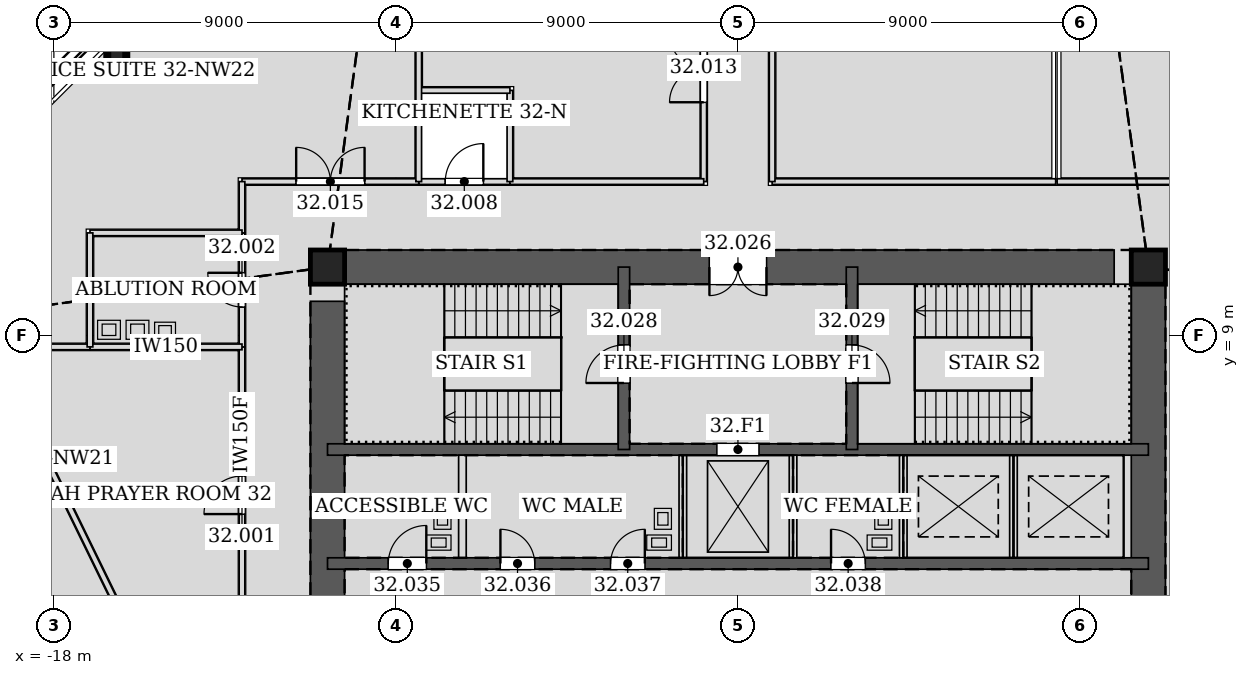
"""IFC4 building model, lengths in metres.
Left out: names, types, materials, properties, quantities, classifications, styles, units other than length and angle.
Written with IfcOpenShell. Run it as: python <this file> out.ifc"""

import sys

from ifc_helpers import new_model, si_unit, direction, frame, frame_2d, origin, origin_2d, place, context, subcontext, project, spatial, rectangle, hollow_rectangle, extrude, element, fill, save


model = new_model("IFC4")
c1 = context("Model", 3, precision=1e-05, world=origin(), true_north=direction((0.0, 1.0)))
c2 = subcontext(c1, "Body", "Model", "MODEL_VIEW")
j1 = project(units=[si_unit("LENGTHUNIT", "METRE"), si_unit("PLANEANGLEUNIT", "RADIAN")], contexts=[c1])
p1 = place(None, origin())
s1 = spatial("IfcSite", under=j1, at=p1, CompositionType="ELEMENT")
p2 = place(p1, origin())
s2 = spatial("IfcBuilding", under=s1, at=p2, CompositionType="ELEMENT")
p3 = place(p2, frame((0.0, 0.0, 142.8)))
s3 = spatial("IfcBuildingStorey", under=s2, at=p3, CompositionType="ELEMENT", Elevation=142.8)
p4 = place(p3, frame((-16.387, 16.387, 0.0), z_axis=(0.019988521213, -0.019988521213, 0.999600379171), x_axis=(0.707106781187, 0.707106781187, 0.0)))
e1 = element("IfcColumn", 1, at=p4, inside=s3, PredefinedType="COLUMN", context=c2, shape_type="SweptSolid", body=[
    extrude(hollow_rectangle(XDim=0.5, YDim=0.5, WallThickness=0.025, at=origin_2d()), origin(), (0.0, 0.0, 1.0), 4.202),
])
for number, where, z_axis, x_axis in (
    (2, (10.8, 10.8, 0.0), (0.0, 0.0, 1.0), (1.0, 0.0, 0.0)),
    (3, (-10.8, 10.8, 0.0), (0.0, 0.0, 1.0), (1.0, 0.0, 0.0)),
):
    element("IfcColumn", number, at=place(p3, frame(where, z_axis=z_axis, x_axis=x_axis)), inside=s3, PredefinedType="COLUMN", context=c2, shape_type="SweptSolid", body=[
        extrude(hollow_rectangle(XDim=0.9, YDim=0.9, WallThickness=0.06, at=origin_2d()), origin(), (0.0, 0.0, 1.0), 4.2),
    ])
p5 = place(p3, frame((10.8, -10.8, 0.0), z_axis=(0.0, 0.0, 1.0), x_axis=(0.0, 1.0, 0.0)))
e4 = element("IfcWall", 4, at=p5, inside=s3, PredefinedType="SOLIDWALL", context=c2, shape_type="SweptSolid", body=[
    extrude(rectangle(XDim=21.6, YDim=0.9, at=frame_2d((10.8, 0.0))), origin(), (0.0, 0.0, 1.0), 4.2),
])
p6 = place(p5, frame((11.7, 0.0, 0.0)))
e5 = element("IfcOpeningElement", 5, at=p6, cuts=e4, PredefinedType="OPENING", context=c2, shape_type="SweptSolid", body=[
    extrude(rectangle(XDim=1.2, YDim=2.1, at=frame_2d((0.6, 1.05))), frame((0.0, 0.46, 0.0), z_axis=(0.0, -1.0, 0.0), x_axis=(1.0, 0.0, 0.0)), (0.0, 0.0, 1.0), 0.92),
])
p7 = place(p5, frame((8.7, 0.0, 0.0)))
e6 = element("IfcOpeningElement", 6, at=p7, cuts=e4, PredefinedType="OPENING", context=c2, shape_type="SweptSolid", body=[
    extrude(rectangle(XDim=1.2, YDim=2.1, at=frame_2d((0.6, 1.05))), frame((0.0, 0.46, 0.0), z_axis=(0.0, -1.0, 0.0), x_axis=(1.0, 0.0, 0.0)), (0.0, 0.0, 1.0), 0.92),
])
p8 = place(p3, frame((10.8, 10.8, 0.0), z_axis=(0.0, 0.0, 1.0), x_axis=(-1.0, 0.0, 0.0)))
e7 = element("IfcWall", 7, at=p8, inside=s3, PredefinedType="SOLIDWALL", context=c2, shape_type="SweptSolid", body=[
    extrude(rectangle(XDim=21.6, YDim=0.9, at=frame_2d((10.8, 0.0))), origin(), (0.0, 0.0, 1.0), 4.2),
])
p9 = place(p8, frame((10.05, 0.0, 0.0)))
e8 = element("IfcOpeningElement", 8, at=p9, cuts=e7, PredefinedType="OPENING", context=c2, shape_type="SweptSolid", body=[
    extrude(rectangle(XDim=1.5, YDim=2.1, at=frame_2d((0.75, 1.05))), frame((0.0, 0.46, 0.0), z_axis=(0.0, -1.0, 0.0), x_axis=(1.0, 0.0, 0.0)), (0.0, 0.0, 1.0), 0.92),
])
p10 = place(p3, frame((-10.8, 10.8, 0.0), z_axis=(0.0, 0.0, 1.0), x_axis=(0.0, -1.0, 0.0)))
e9 = element("IfcWall", 9, at=p10, inside=s3, PredefinedType="SOLIDWALL", context=c2, shape_type="SweptSolid", body=[
    extrude(rectangle(XDim=21.6, YDim=0.9, at=frame_2d((10.8, 0.0))), origin(), (0.0, 0.0, 1.0), 4.2),
])
p11 = place(p10, frame((8.7, 0.0, 0.0)))
e10 = element("IfcOpeningElement", 10, at=p11, cuts=e9, PredefinedType="OPENING", context=c2, shape_type="SweptSolid", body=[
    extrude(rectangle(XDim=1.2, YDim=2.1, at=frame_2d((0.6, 1.05))), frame((0.0, 0.46, 0.0), z_axis=(0.0, -1.0, 0.0), x_axis=(1.0, 0.0, 0.0)), (0.0, 0.0, 1.0), 0.92),
])
p12 = place(p10, frame((11.7, 0.0, 0.0)))
e11 = element("IfcOpeningElement", 11, at=p12, cuts=e9, PredefinedType="OPENING", context=c2, shape_type="SweptSolid", body=[
    extrude(rectangle(XDim=1.2, YDim=2.1, at=frame_2d((0.6, 1.05))), frame((0.0, 0.46, 0.0), z_axis=(0.0, -1.0, 0.0), x_axis=(1.0, 0.0, 0.0)), (0.0, 0.0, 1.0), 0.92),
])
p13 = place(p3, frame((-10.8, 3.0, 0.0), z_axis=(0.0, 0.0, 1.0), x_axis=(1.0, 0.0, 0.0)))
e12 = element("IfcWall", 12, at=p13, inside=s3, PredefinedType="SOLIDWALL", context=c2, shape_type="SweptSolid", body=[
    extrude(rectangle(XDim=21.6, YDim=0.3, at=frame_2d((10.8, 0.0))), origin(), (0.0, 0.0, 1.0), 4.2),
])
p14 = place(p13, frame((1.6, 0.0, 0.0)))
e13 = element("IfcOpeningElement", 13, at=p14, cuts=e12, PredefinedType="OPENING", context=c2, shape_type="SweptSolid", body=[
    extrude(rectangle(XDim=1.0, YDim=2.1, at=frame_2d((0.5, 1.05))), frame((0.0, 0.16, 0.0), z_axis=(0.0, -1.0, 0.0), x_axis=(1.0, 0.0, 0.0)), (0.0, 0.0, 1.0), 0.32),
])
p15 = place(p13, frame((4.55, 0.0, 0.0)))
e14 = element("IfcOpeningElement", 14, at=p15, cuts=e12, PredefinedType="OPENING", context=c2, shape_type="SweptSolid", body=[
    extrude(rectangle(XDim=0.9, YDim=2.1, at=frame_2d((0.45, 1.05))), frame((0.0, 0.16, 0.0), z_axis=(0.0, -1.0, 0.0), x_axis=(1.0, 0.0, 0.0)), (0.0, 0.0, 1.0), 0.32),
])
p16 = place(p13, frame((7.45, 0.0, 0.0)))
e15 = element("IfcOpeningElement", 15, at=p16, cuts=e12, PredefinedType="OPENING", context=c2, shape_type="SweptSolid", body=[
    extrude(rectangle(XDim=0.9, YDim=2.1, at=frame_2d((0.45, 1.05))), frame((0.0, 0.16, 0.0), z_axis=(0.0, -1.0, 0.0), x_axis=(1.0, 0.0, 0.0)), (0.0, 0.0, 1.0), 0.32),
])
p17 = place(p13, frame((13.25, 0.0, 0.0)))
e16 = element("IfcOpeningElement", 16, at=p17, cuts=e12, PredefinedType="OPENING", context=c2, shape_type="SweptSolid", body=[
    extrude(rectangle(XDim=0.9, YDim=2.1, at=frame_2d((0.45, 1.05))), frame((0.0, 0.16, 0.0), z_axis=(0.0, -1.0, 0.0), x_axis=(1.0, 0.0, 0.0)), (0.0, 0.0, 1.0), 0.32),
])
p18 = place(p3, frame((-10.8, 6.0, 0.0), z_axis=(0.0, 0.0, 1.0), x_axis=(1.0, 0.0, 0.0)))
e17 = element("IfcWall", 17, at=p18, inside=s3, PredefinedType="SOLIDWALL", context=c2, shape_type="SweptSolid", body=[
    extrude(rectangle(XDim=21.6, YDim=0.3, at=frame_2d((10.8, 0.0))), origin(), (0.0, 0.0, 1.0), 4.2),
])
p19 = place(p18, frame((10.25, 0.0, 0.0)))
e18 = element("IfcOpeningElement", 18, at=p19, cuts=e17, PredefinedType="OPENING", context=c2, shape_type="SweptSolid", body=[
    extrude(rectangle(XDim=1.1, YDim=2.1, at=frame_2d((0.55, 1.05))), frame((0.0, 0.16, 0.0), z_axis=(0.0, -1.0, 0.0), x_axis=(1.0, 0.0, 0.0)), (0.0, 0.0, 1.0), 0.32),
])
p20 = place(p3, frame((-3.0, 6.0, 0.0), z_axis=(0.0, 0.0, 1.0), x_axis=(0.0, 1.0, 0.0)))
e19 = element("IfcWall", 19, at=p20, inside=s3, PredefinedType="SOLIDWALL", context=c2, shape_type="SweptSolid", body=[
    extrude(rectangle(XDim=4.8, YDim=0.3, at=frame_2d((2.4, 0.0))), origin(), (0.0, 0.0, 1.0), 4.2),
])
p21 = place(p20, frame((1.75, 0.0, 0.0)))
e20 = element("IfcOpeningElement", 20, at=p21, cuts=e19, PredefinedType="OPENING", context=c2, shape_type="SweptSolid", body=[
    extrude(rectangle(XDim=1.0, YDim=2.1, at=frame_2d((0.5, 1.05))), frame((0.0, 0.16, 0.0), z_axis=(0.0, -1.0, 0.0), x_axis=(1.0, 0.0, 0.0)), (0.0, 0.0, 1.0), 0.32),
])
p22 = place(p3, frame((3.0, 6.0, 0.0), z_axis=(0.0, 0.0, 1.0), x_axis=(0.0, 1.0, 0.0)))
e21 = element("IfcWall", 21, at=p22, inside=s3, PredefinedType="SOLIDWALL", context=c2, shape_type="SweptSolid", body=[
    extrude(rectangle(XDim=4.8, YDim=0.3, at=frame_2d((2.4, 0.0))), origin(), (0.0, 0.0, 1.0), 4.2),
])
p23 = place(p22, frame((1.75, 0.0, 0.0)))
e22 = element("IfcOpeningElement", 22, at=p23, cuts=e21, PredefinedType="OPENING", context=c2, shape_type="SweptSolid", body=[
    extrude(rectangle(XDim=1.0, YDim=2.1, at=frame_2d((0.5, 1.05))), frame((0.0, 0.16, 0.0), z_axis=(0.0, -1.0, 0.0), x_axis=(1.0, 0.0, 0.0)), (0.0, 0.0, 1.0), 0.32),
])
p24 = place(p3, frame((-13.05, 8.701, 0.0), z_axis=(0.0, 0.0, 1.0), x_axis=(0.0, -1.0, 0.0)))
e23 = element("IfcWall", 23, at=p24, inside=s3, PredefinedType="PARTITIONING", context=c2, shape_type="SweptSolid", body=[
    extrude(rectangle(XDim=7.801, YDim=0.15, at=frame_2d((3.9, 0.0))), origin(), (0.0, 0.0, 1.0), 4.035),
])
p25 = place(p24, frame((3.4, 0.0, 0.0)))
e24 = element("IfcOpeningElement", 24, at=p25, cuts=e23, PredefinedType="OPENING", context=c2, shape_type="SweptSolid", body=[
    extrude(rectangle(XDim=1.0, YDim=2.1, at=frame_2d((0.5, 1.05))), frame((0.0, 0.085, 0.0), z_axis=(0.0, -1.0, 0.0), x_axis=(1.0, 0.0, 0.0)), (0.0, 0.0, 1.0), 0.17),
])
p26 = place(p3, frame((-13.05, 11.701, 0.0), z_axis=(0.0, 0.0, 1.0), x_axis=(0.0, -1.0, 0.0)))
e25 = element("IfcWall", 25, at=p26, inside=s3, PredefinedType="PARTITIONING", context=c2, shape_type="SweptSolid", body=[
    extrude(rectangle(XDim=3.002, YDim=0.15, at=frame_2d((1.501, 0.0))), origin(), (0.0, 0.0, 1.0), 3.098),
])
p27 = place(p26, frame((1.051, 0.0, 0.0)))
e26 = element("IfcOpeningElement", 26, at=p27, cuts=e25, PredefinedType="OPENING", context=c2, shape_type="SweptSolid", body=[
    extrude(rectangle(XDim=0.9, YDim=2.1, at=frame_2d((0.45, 1.05))), frame((0.0, 0.085, 0.0), z_axis=(0.0, -1.0, 0.0), x_axis=(1.0, 0.0, 0.0)), (0.0, 0.0, 1.0), 0.17),
])
p28 = place(p3, frame((-5.999, 13.05, 0.0), z_axis=(0.0, 0.0, 1.0), x_axis=(-1.0, 0.0, 0.0)))
e27 = element("IfcWall", 27, at=p28, inside=s3, PredefinedType="PARTITIONING", context=c2, shape_type="SweptSolid", body=[
    extrude(rectangle(XDim=2.402, YDim=0.15, at=frame_2d((1.201, 0.0))), origin(), (0.0, 0.0, 1.0), 4.035),
])
p29 = place(p28, frame((0.701, 0.0, 0.0)))
e28 = element("IfcOpeningElement", 28, at=p29, cuts=e27, PredefinedType="OPENING", context=c2, shape_type="SweptSolid", body=[
    extrude(rectangle(XDim=1.0, YDim=2.1, at=frame_2d((0.5, 1.05))), frame((0.0, 0.085, 0.0), z_axis=(0.0, -1.0, 0.0), x_axis=(1.0, 0.0, 0.0)), (0.0, 0.0, 1.0), 0.17),
])
p30 = place(p3, frame((8.361, 13.05, 0.0), z_axis=(0.0, 0.0, 1.0), x_axis=(-1.0, 0.0, 0.0)))
e29 = element("IfcWall", 29, at=p30, inside=s3, PredefinedType="PARTITIONING", context=c2, shape_type="SweptSolid", body=[
    extrude(rectangle(XDim=7.461, YDim=0.15, at=frame_2d((3.73, 0.0))), origin(), (0.0, 0.0, 1.0), 4.035),
])
p31 = place(p3, frame((0.9, 13.05, 0.0), z_axis=(0.0, 0.0, 1.0), x_axis=(0.0, 1.0, 0.0)))
e30 = element("IfcWall", 30, at=p31, inside=s3, PredefinedType="PARTITIONING", context=c2, shape_type="SweptSolid", body=[
    extrude(rectangle(XDim=10.909, YDim=0.15, at=frame_2d((5.455, 0.0))), origin(), (0.0, 0.0, 1.0), 3.426),
])
p32 = place(p31, frame((4.338, 0.0, 0.0)))
e31 = element("IfcOpeningElement", 31, at=p32, cuts=e30, PredefinedType="OPENING", context=c2, shape_type="SweptSolid", body=[
    extrude(rectangle(XDim=1.8, YDim=2.4, at=frame_2d((0.9, 1.2))), frame((0.0, 0.085, 0.0), z_axis=(0.0, -1.0, 0.0), x_axis=(1.0, 0.0, 0.0)), (0.0, 0.0, 1.0), 0.17),
])
p33 = place(p3, frame((13.05, 13.05, 0.0), z_axis=(0.0, 0.0, 1.0), x_axis=(-1.0, 0.0, 0.0)))
e32 = element("IfcWall", 32, at=p33, inside=s3, PredefinedType="PARTITIONING", context=c2, shape_type="SweptSolid", body=[
    extrude(rectangle(XDim=4.651, YDim=0.15, at=frame_2d((2.326, 0.0))), origin(), (0.0, 0.0, 1.0), 3.098),
])
p34 = place(p3, frame((-0.9, 19.026, 0.0), z_axis=(0.0, 0.0, 1.0), x_axis=(0.0, -1.0, 0.0)))
e33 = element("IfcWall", 33, at=p34, inside=s3, PredefinedType="PARTITIONING", context=c2, shape_type="SweptSolid", body=[
    extrude(rectangle(XDim=5.976, YDim=0.15, at=frame_2d((2.988, 0.0))), origin(), (0.0, 0.0, 1.0), 3.426),
])
p35 = place(p34, frame((2.088, 0.0, 0.0)))
e34 = element("IfcOpeningElement", 34, at=p35, cuts=e33, PredefinedType="OPENING", context=c2, shape_type="SweptSolid", body=[
    extrude(rectangle(XDim=1.8, YDim=2.4, at=frame_2d((0.9, 1.2))), frame((0.0, 0.085, 0.0), z_axis=(0.0, -1.0, 0.0), x_axis=(1.0, 0.0, 0.0)), (0.0, 0.0, 1.0), 0.17),
])
p36 = place(p3, frame((-0.9, 13.05, 0.0), z_axis=(0.0, 0.0, 1.0), x_axis=(-1.0, 0.0, 0.0)))
e35 = element("IfcWall", 35, at=p36, inside=s3, PredefinedType="PARTITIONING", context=c2, shape_type="SweptSolid", body=[
    extrude(rectangle(XDim=5.101, YDim=0.15, at=frame_2d((2.551, 0.0))), origin(), (0.0, 0.0, 1.0), 4.035),
])
p37 = place(p3, frame((-8.399, 13.05, 0.0), z_axis=(0.0, 0.0, 1.0), x_axis=(-1.0, 0.0, 0.0)))
e36 = element("IfcWall", 36, at=p37, inside=s3, PredefinedType="PARTITIONING", context=c2, shape_type="SweptSolid", body=[
    extrude(rectangle(XDim=4.651, YDim=0.15, at=frame_2d((2.326, 0.0))), origin(), (0.0, 0.0, 1.0), 3.098),
])
p38 = place(p37, frame((1.426, 0.0, 0.0)))
e37 = element("IfcOpeningElement", 37, at=p38, cuts=e36, PredefinedType="OPENING", context=c2, shape_type="SweptSolid", body=[
    extrude(rectangle(XDim=1.8, YDim=2.4, at=frame_2d((0.9, 1.2))), frame((0.0, 0.085, 0.0), z_axis=(0.0, -1.0, 0.0), x_axis=(1.0, 0.0, 0.0)), (0.0, 0.0, 1.0), 0.17),
])
p39 = place(p3, frame((-13.05, 13.05, 0.0), z_axis=(0.0, 0.0, 1.0), x_axis=(0.0, -1.0, 0.0)))
e38 = element("IfcWall", 38, at=p39, inside=s3, PredefinedType="PARTITIONING", context=c2, shape_type="SweptSolid", body=[
    extrude(rectangle(XDim=1.351, YDim=0.15, at=frame_2d((0.676, 0.0))), origin(), (0.0, 0.0, 1.0), 3.263),
])
p40 = place(p3, frame((-13.05, 8.7, 0.0), z_axis=(0.0, 0.0, 1.0), x_axis=(-1.0, 0.0, 0.0)))
e39 = element("IfcWall", 39, at=p40, inside=s3, PredefinedType="PARTITIONING", context=c2, shape_type="SweptSolid", body=[
    extrude(rectangle(XDim=4.001, YDim=0.15, at=frame_2d((2.0, 0.0))), origin(), (0.0, 0.0, 1.0), 3.426),
])
p41 = place(p3, frame((-19.503, 8.398, 0.0), z_axis=(0.0, 0.0, 1.0), x_axis=(0.438377506249, -0.898790944555, 0.0)))
e40 = element("IfcWall", 40, at=p41, inside=s3, PredefinedType="PARTITIONING", context=c2, shape_type="SweptSolid", body=[
    extrude(rectangle(XDim=8.343, YDim=0.15, at=frame_2d((4.171, 0.0))), origin(), (0.0, 0.0, 1.0), 3.499),
])
p42 = place(p3, frame((-17.049, 8.7, 0.0), z_axis=(0.0, 0.0, 1.0), x_axis=(-1.0, 0.0, 0.0)))
e41 = element("IfcWall", 41, at=p42, inside=s3, PredefinedType="PARTITIONING", context=c2, shape_type="SweptSolid", body=[
    extrude(rectangle(XDim=2.481, YDim=0.15, at=frame_2d((1.24, 0.0))), origin(), (0.0, 0.0, 1.0), 3.499),
])
p43 = place(p3, frame((-13.05, 11.7, 0.0), z_axis=(0.0, 0.0, 1.0), x_axis=(-1.0, 0.0, 0.0)))
e42 = element("IfcWall", 42, at=p43, inside=s3, PredefinedType="PARTITIONING", context=c2, shape_type="SweptSolid", body=[
    extrude(rectangle(XDim=4.0, YDim=0.15, at=frame_2d((2.0, 0.0))), origin(), (0.0, 0.0, 1.0), 3.715),
])
p44 = place(p3, frame((-17.05, 11.7, 0.0), z_axis=(0.0, 0.0, 1.0), x_axis=(0.0, -1.0, 0.0)))
e43 = element("IfcWall", 43, at=p44, inside=s3, PredefinedType="PARTITIONING", context=c2, shape_type="SweptSolid", body=[
    extrude(rectangle(XDim=3.0, YDim=0.15, at=frame_2d((1.5, 0.0))), origin(), (0.0, 0.0, 1.0), 3.098),
])
p45 = place(p3, frame((-6.0, 13.05, 0.0), z_axis=(0.0, 0.0, 1.0), x_axis=(0.0, 1.0, 0.0)))
e44 = element("IfcWall", 44, at=p45, inside=s3, PredefinedType="PARTITIONING", context=c2, shape_type="SweptSolid", body=[
    extrude(rectangle(XDim=2.4, YDim=0.15, at=frame_2d((1.2, 0.0))), origin(), (0.0, 0.0, 1.0), 3.426),
])
p46 = place(p3, frame((-6.0, 15.45, 0.0), z_axis=(0.0, 0.0, 1.0), x_axis=(-1.0, 0.0, 0.0)))
e45 = element("IfcWall", 45, at=p46, inside=s3, PredefinedType="PARTITIONING", context=c2, shape_type="SweptSolid", body=[
    extrude(rectangle(XDim=2.4, YDim=0.15, at=frame_2d((1.2, 0.0))), origin(), (0.0, 0.0, 1.0), 4.035),
])
p47 = place(p3, frame((-8.4, 13.05, 0.0), z_axis=(0.0, 0.0, 1.0), x_axis=(0.0, 1.0, 0.0)))
e46 = element("IfcWall", 46, at=p47, inside=s3, PredefinedType="PARTITIONING", context=c2, shape_type="SweptSolid", body=[
    extrude(rectangle(XDim=8.621, YDim=0.15, at=frame_2d((4.311, 0.0))), origin(), (0.0, 0.0, 1.0), 3.426),
])
for number, where, z_axis, x_axis in (
    (47, (-7.25, 3.15, 0.0), (0.0, 0.0, 1.0), (0.0, 1.0, 0.0)),
    (48, (-1.45, 3.15, 0.0), (0.0, 0.0, 1.0), (0.0, 1.0, 0.0)),
    (49, (1.45, 3.15, 0.0), (0.0, 0.0, 1.0), (0.0, 1.0, 0.0)),
    (50, (4.35, 3.15, 0.0), (0.0, 0.0, 1.0), (0.0, 1.0, 0.0)),
):
    element("IfcWall", number, at=place(p3, frame(where, z_axis=z_axis, x_axis=x_axis)), inside=s3, PredefinedType="PARTITIONING", context=c2, shape_type="SweptSolid", body=[
        extrude(rectangle(XDim=2.7, YDim=0.2, at=frame_2d((1.35, 0.0))), origin(), (0.0, 0.0, 1.0), 4.035),
    ])
p48 = place(p3, frame((7.25, 3.15, 0.0), z_axis=(0.0, 0.0, 1.0), x_axis=(0.0, 1.0, 0.0)))
e51 = element("IfcWall", 51, at=p48, inside=s3, PredefinedType="PARTITIONING", context=c2, shape_type="SweptSolid", body=[
    extrude(rectangle(XDim=2.7, YDim=0.2, at=frame_2d((1.35, 0.0))), origin(), (0.0, 0.0, 1.0), 4.2),
])
p49 = place(p25, frame((1.0, 0.0, 0.0), z_axis=(0.0, 0.0, 1.0), x_axis=(-1.0, 0.0, 0.0)))
e52 = element("IfcDoor", 52, at=p49, inside=s3, OperationType="SINGLE_SWING_LEFT", PredefinedType="DOOR", context=c2, shape_type="SweptSolid", body=[
    extrude(rectangle(XDim=1.0, YDim=2.1, at=frame_2d((0.5, 1.05))), frame((0.0, 0.025, 0.0), z_axis=(0.0, -1.0, 0.0), x_axis=(1.0, 0.0, 0.0)), (0.0, 0.0, 1.0), 0.05),
])
fill(e24, e52)
p50 = place(p27, frame((0.9, 0.0, 0.0), z_axis=(0.0, 0.0, 1.0), x_axis=(-1.0, 0.0, 0.0)))
e53 = element("IfcDoor", 53, at=p50, inside=s3, OperationType="SINGLE_SWING_RIGHT", PredefinedType="DOOR", context=c2, shape_type="SweptSolid", body=[
    extrude(rectangle(XDim=0.9, YDim=2.1, at=frame_2d((0.45, 1.05))), frame((0.0, 0.025, 0.0), z_axis=(0.0, -1.0, 0.0), x_axis=(1.0, 0.0, 0.0)), (0.0, 0.0, 1.0), 0.05),
])
fill(e26, e53)
p51 = place(p29, frame((1.0, 0.0, 0.0), z_axis=(0.0, 0.0, 1.0), x_axis=(-1.0, 0.0, 0.0)))
e54 = element("IfcDoor", 54, at=p51, inside=s3, OperationType="SINGLE_SWING_RIGHT", PredefinedType="DOOR", context=c2, shape_type="SweptSolid", body=[
    extrude(rectangle(XDim=1.0, YDim=2.1, at=frame_2d((0.5, 1.05))), frame((0.0, 0.025, 0.0), z_axis=(0.0, -1.0, 0.0), x_axis=(1.0, 0.0, 0.0)), (0.0, 0.0, 1.0), 0.05),
])
fill(e28, e54)
p52 = place(p35, frame((1.8, 0.0, 0.0), z_axis=(0.0, 0.0, 1.0), x_axis=(-1.0, 0.0, 0.0)))
e55 = element("IfcDoor", 55, at=p52, inside=s3, OperationType="DOUBLE_DOOR_SINGLE_SWING", PredefinedType="DOOR", context=c2, shape_type="SweptSolid", body=[
    extrude(rectangle(XDim=1.8, YDim=2.4, at=frame_2d((0.9, 1.2))), frame((0.0, 0.025, 0.0), z_axis=(0.0, -1.0, 0.0), x_axis=(1.0, 0.0, 0.0)), (0.0, 0.0, 1.0), 0.05),
])
fill(e34, e55)
p53 = place(p38, frame((1.8, 0.0, 0.0), z_axis=(0.0, 0.0, 1.0), x_axis=(-1.0, 0.0, 0.0)))
e56 = element("IfcDoor", 56, at=p53, inside=s3, OperationType="DOUBLE_DOOR_SINGLE_SWING", PredefinedType="DOOR", context=c2, shape_type="SweptSolid", body=[
    extrude(rectangle(XDim=1.8, YDim=2.4, at=frame_2d((0.9, 1.2))), frame((0.0, 0.025, 0.0), z_axis=(0.0, -1.0, 0.0), x_axis=(1.0, 0.0, 0.0)), (0.0, 0.0, 1.0), 0.05),
])
fill(e37, e56)
p54 = place(p9, origin())
e57 = element("IfcDoor", 57, at=p54, inside=s3, OperationType="DOUBLE_DOOR_SINGLE_SWING", PredefinedType="DOOR", context=c2, shape_type="SweptSolid", body=[
    extrude(rectangle(XDim=1.5, YDim=2.1, at=frame_2d((0.75, 1.05))), frame((0.0, 0.025, 0.0), z_axis=(0.0, -1.0, 0.0), x_axis=(1.0, 0.0, 0.0)), (0.0, 0.0, 1.0), 0.05),
])
fill(e8, e57)
p55 = place(p21, origin())
e58 = element("IfcDoor", 58, at=p55, inside=s3, OperationType="SINGLE_SWING_LEFT", PredefinedType="DOOR", context=c2, shape_type="SweptSolid", body=[
    extrude(rectangle(XDim=1.0, YDim=2.1, at=frame_2d((0.5, 1.05))), frame((0.0, 0.025, 0.0), z_axis=(0.0, -1.0, 0.0), x_axis=(1.0, 0.0, 0.0)), (0.0, 0.0, 1.0), 0.05),
])
fill(e20, e58)
p56 = place(p23, frame((1.0, 0.0, 0.0), z_axis=(0.0, 0.0, 1.0), x_axis=(-1.0, 0.0, 0.0)))
e59 = element("IfcDoor", 59, at=p56, inside=s3, OperationType="SINGLE_SWING_RIGHT", PredefinedType="DOOR", context=c2, shape_type="SweptSolid", body=[
    extrude(rectangle(XDim=1.0, YDim=2.1, at=frame_2d((0.5, 1.05))), frame((0.0, 0.025, 0.0), z_axis=(0.0, -1.0, 0.0), x_axis=(1.0, 0.0, 0.0)), (0.0, 0.0, 1.0), 0.05),
])
fill(e22, e59)
p57 = place(p14, origin())
e60 = element("IfcDoor", 60, at=p57, inside=s3, OperationType="SINGLE_SWING_RIGHT", PredefinedType="DOOR", context=c2, shape_type="SweptSolid", body=[
    extrude(rectangle(XDim=1.0, YDim=2.1, at=frame_2d((0.5, 1.05))), frame((0.0, 0.025, 0.0), z_axis=(0.0, -1.0, 0.0), x_axis=(1.0, 0.0, 0.0)), (0.0, 0.0, 1.0), 0.05),
])
fill(e13, e60)
p58 = place(p15, origin())
e61 = element("IfcDoor", 61, at=p58, inside=s3, OperationType="SINGLE_SWING_LEFT", PredefinedType="DOOR", context=c2, shape_type="SweptSolid", body=[
    extrude(rectangle(XDim=0.9, YDim=2.1, at=frame_2d((0.45, 1.05))), frame((0.0, 0.025, 0.0), z_axis=(0.0, -1.0, 0.0), x_axis=(1.0, 0.0, 0.0)), (0.0, 0.0, 1.0), 0.05),
])
fill(e14, e61)
p59 = place(p16, origin())
e62 = element("IfcDoor", 62, at=p59, inside=s3, OperationType="SINGLE_SWING_RIGHT", PredefinedType="DOOR", context=c2, shape_type="SweptSolid", body=[
    extrude(rectangle(XDim=0.9, YDim=2.1, at=frame_2d((0.45, 1.05))), frame((0.0, 0.025, 0.0), z_axis=(0.0, -1.0, 0.0), x_axis=(1.0, 0.0, 0.0)), (0.0, 0.0, 1.0), 0.05),
])
fill(e15, e62)
p60 = place(p17, origin())
e63 = element("IfcDoor", 63, at=p60, inside=s3, OperationType="SINGLE_SWING_LEFT", PredefinedType="DOOR", context=c2, shape_type="SweptSolid", body=[
    extrude(rectangle(XDim=0.9, YDim=2.1, at=frame_2d((0.45, 1.05))), frame((0.0, 0.025, 0.0), z_axis=(0.0, -1.0, 0.0), x_axis=(1.0, 0.0, 0.0)), (0.0, 0.0, 1.0), 0.05),
])
fill(e16, e63)
p61 = place(p19, origin())
e64 = element("IfcDoor", 64, at=p61, inside=s3, OperationType="DOUBLE_DOOR_SLIDING", PredefinedType="DOOR", context=c2, shape_type="SweptSolid", body=[
    extrude(rectangle(XDim=1.1, YDim=2.1, at=frame_2d((0.55, 1.05))), frame((0.0, 0.025, 0.0), z_axis=(0.0, -1.0, 0.0), x_axis=(1.0, 0.0, 0.0)), (0.0, 0.0, 1.0), 0.05),
])
fill(e18, e64)
save(model, sys.argv[1])
